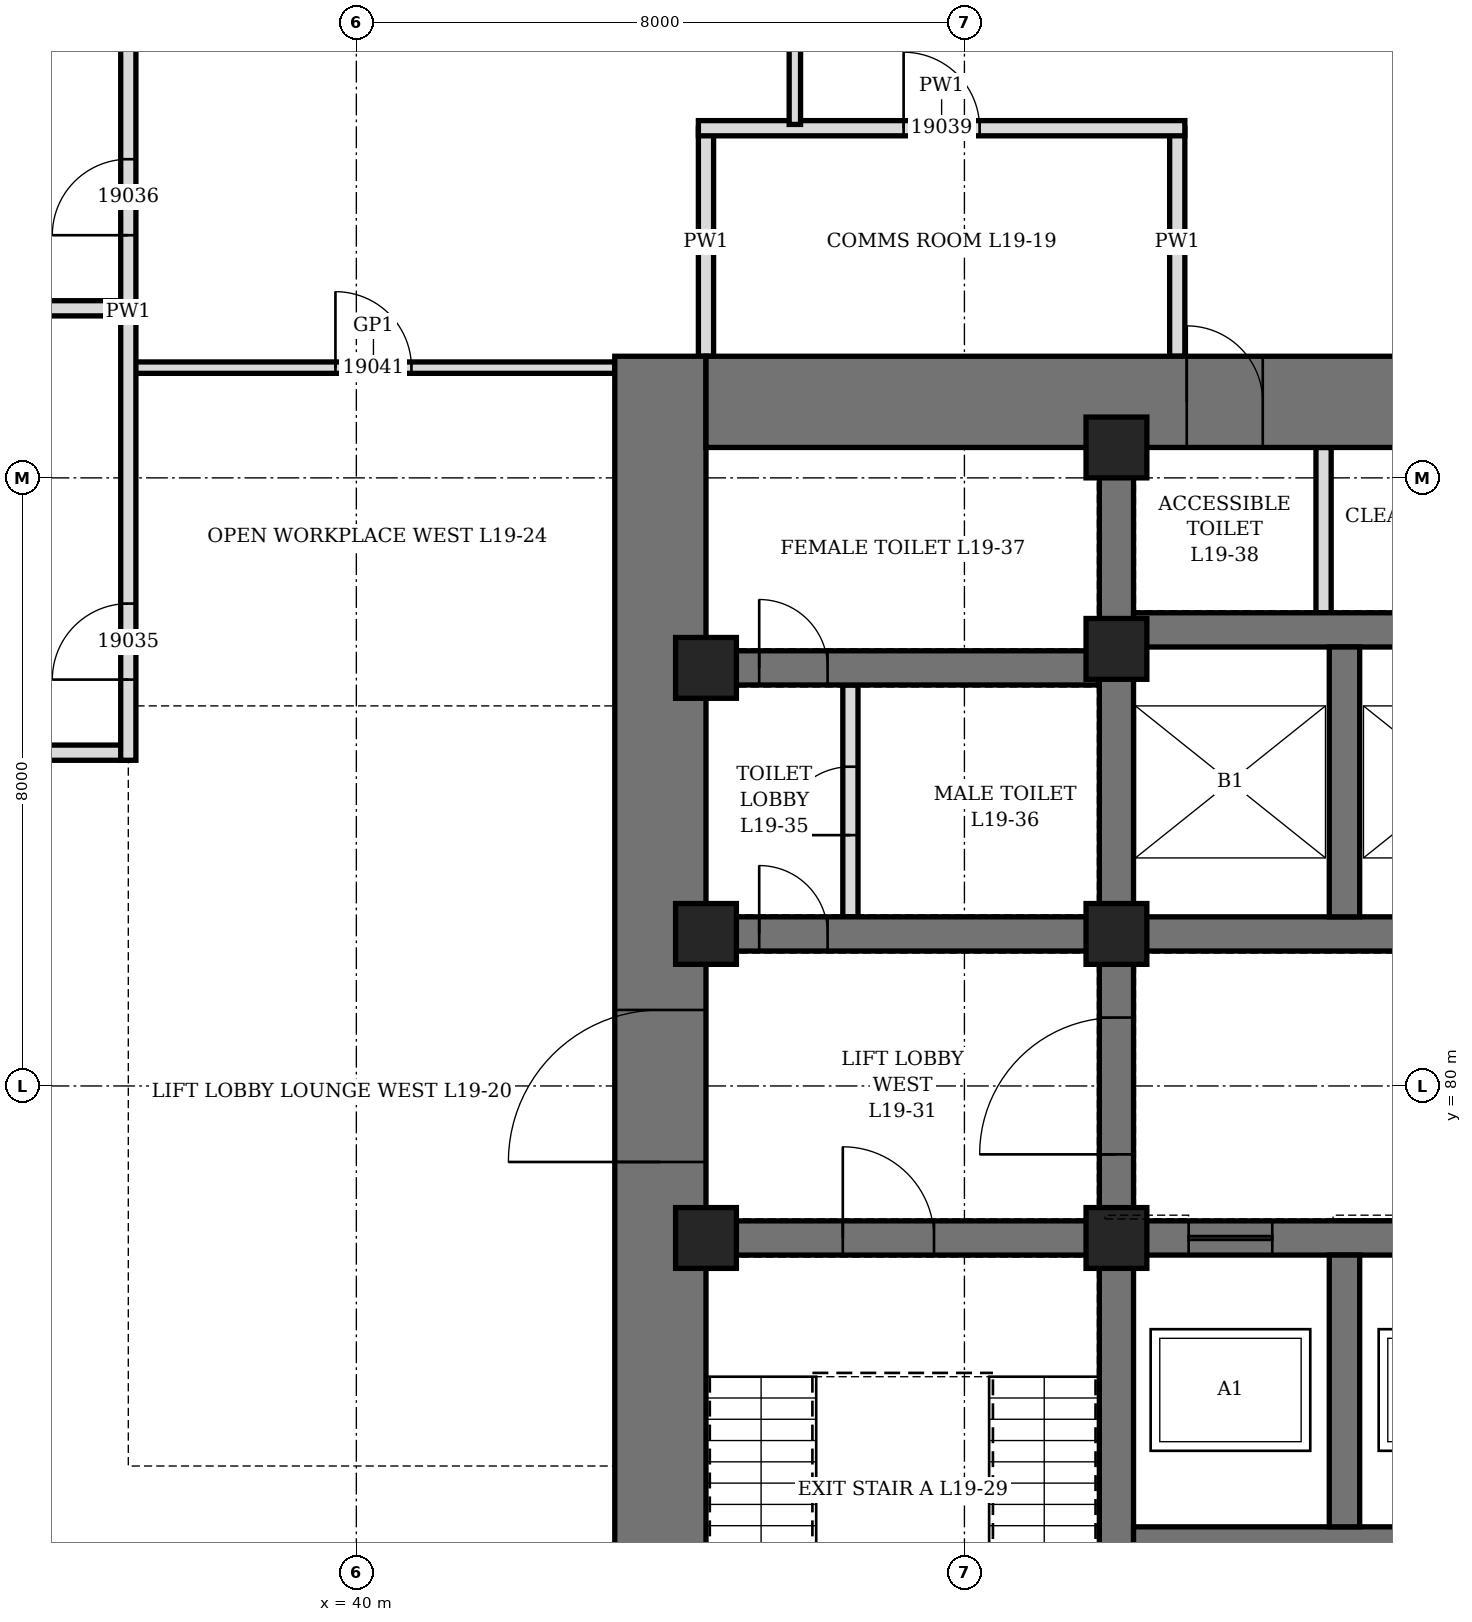
"""IFC4 building model, lengths in metres.
Left out: names, types, materials, properties, quantities, classifications, styles, units other than length and angle.
Written with IfcOpenShell. Run it as: python <this file> out.ifc"""

import sys

from ifc_helpers import new_model, si_unit, direction, frame, frame_2d, origin, origin_2d, place, context, subcontext, project, spatial, rectangle, hollow_rectangle, extrude, element, fill, save


model = new_model("IFC4")
c1 = context("Model", 3, precision=1e-05, world=origin(), true_north=direction((0.0, 1.0)))
c2 = subcontext(c1, "Body", "Model", "MODEL_VIEW")
j1 = project(units=[si_unit("LENGTHUNIT", "METRE"), si_unit("PLANEANGLEUNIT", "RADIAN")], contexts=[c1])
p1 = place(None, origin())
s1 = spatial("IfcSite", under=j1, at=p1, CompositionType="ELEMENT")
p2 = place(p1, origin())
s2 = spatial("IfcBuilding", under=s1, at=p2, CompositionType="ELEMENT")
p3 = place(p2, frame((0.0, 0.0, 89.5)))
s3 = spatial("IfcBuildingStorey", under=s2, at=p3, CompositionType="ELEMENT", Elevation=89.5)
p4 = place(p3, frame((44.0, 70.4, 0.0), z_axis=(0.0, 0.0, 1.0), x_axis=(0.0, 1.0, 0.0)))
e1 = element("IfcWall", 1, at=p4, inside=s3, PredefinedType="SHEAR", context=c2, shape_type="SweptSolid", body=[
    extrude(rectangle(XDim=19.2, YDim=1.2, at=frame_2d((9.6, 0.0))), origin(), (0.0, 0.0, 1.0), 4.2),
])
p5 = place(p4, frame((8.6, 0.0, 0.0)))
e2 = element("IfcOpeningElement", 2, at=p5, cuts=e1, PredefinedType="OPENING", context=c2, shape_type="SweptSolid", body=[
    extrude(rectangle(XDim=2.0, YDim=2.4, at=frame_2d((1.0, 1.2))), frame((0.0, 0.61, 0.0), z_axis=(0.0, -1.0, 0.0), x_axis=(1.0, 0.0, 0.0)), (0.0, 0.0, 1.0), 1.22),
])
p6 = place(p3, frame((44.6, 89.0, 0.0), z_axis=(0.0, 0.0, 1.0), x_axis=(1.0, 0.0, 0.0)))
e3 = element("IfcWall", 3, at=p6, inside=s3, PredefinedType="SHEAR", context=c2, shape_type="SweptSolid", body=[
    extrude(rectangle(XDim=22.8, YDim=1.2, at=frame_2d((11.4, 0.0))), origin(), (0.0, 0.0, 1.0), 4.2),
])
p7 = place(p6, frame((6.325, 0.0, 0.0)))
e4 = element("IfcOpeningElement", 4, at=p7, cuts=e3, PredefinedType="OPENING", context=c2, shape_type="SweptSolid", body=[
    extrude(rectangle(XDim=1.0, YDim=2.1, at=frame_2d((0.5, 1.05))), frame((0.0, 0.61, 0.0), z_axis=(0.0, -1.0, 0.0), x_axis=(1.0, 0.0, 0.0)), (0.0, 0.0, 1.0), 1.22),
])
p8 = place(p6, frame((9.25, 0.0, 0.0)))
e5 = element("IfcOpeningElement", 5, at=p8, cuts=e3, PredefinedType="OPENING", context=c2, shape_type="SweptSolid", body=[
    extrude(rectangle(XDim=0.9, YDim=2.1, at=frame_2d((0.45, 1.05))), frame((0.0, 0.61, 0.0), z_axis=(0.0, -1.0, 0.0), x_axis=(1.0, 0.0, 0.0)), (0.0, 0.0, 1.0), 1.22),
])
p9 = place(p6, frame((13.012, 0.0, 0.0)))
e6 = element("IfcOpeningElement", 6, at=p9, cuts=e3, PredefinedType="OPENING", context=c2, shape_type="SweptSolid", body=[
    extrude(rectangle(XDim=0.9, YDim=2.1, at=frame_2d((0.45, 1.05))), frame((0.0, 0.61, 0.0), z_axis=(0.0, -1.0, 0.0), x_axis=(1.0, 0.0, 0.0)), (0.0, 0.0, 1.0), 1.22),
])
p10 = place(p3, frame((50.0, 71.6, 0.0), z_axis=(0.0, 0.0, 1.0), x_axis=(0.0, 1.0, 0.0)))
e7 = element("IfcWall", 7, at=p10, inside=s3, PredefinedType="SHEAR", context=c2, shape_type="SweptSolid", body=[
    extrude(rectangle(XDim=16.8, YDim=0.45, at=frame_2d((8.4, 0.0))), origin(), (0.0, 0.0, 1.0), 4.2),
])
p11 = place(p10, frame((7.5, 0.0, 0.0)))
e8 = element("IfcOpeningElement", 8, at=p11, cuts=e7, PredefinedType="OPENING", context=c2, shape_type="SweptSolid", body=[
    extrude(rectangle(XDim=1.8, YDim=2.4, at=frame_2d((0.9, 1.2))), frame((0.0, 0.235, 0.0), z_axis=(0.0, -1.0, 0.0), x_axis=(1.0, 0.0, 0.0)), (0.0, 0.0, 1.0), 0.47),
])
p12 = place(p3, frame((44.6, 78.0, 0.0), z_axis=(0.0, 0.0, 1.0), x_axis=(1.0, 0.0, 0.0)))
e9 = element("IfcWall", 9, at=p12, inside=s3, PredefinedType="SHEAR", context=c2, shape_type="SweptSolid", body=[
    extrude(rectangle(XDim=5.175, YDim=0.45, at=frame_2d((2.587, 0.0))), origin(), (0.0, 0.0, 1.0), 4.2),
])
p13 = place(p12, frame((1.8, 0.0, 0.0)))
e10 = element("IfcOpeningElement", 10, at=p13, cuts=e9, PredefinedType="OPENING", context=c2, shape_type="SweptSolid", body=[
    extrude(rectangle(XDim=1.2, YDim=2.1, at=frame_2d((0.6, 1.05))), frame((0.0, 0.235, 0.0), z_axis=(0.0, -1.0, 0.0), x_axis=(1.0, 0.0, 0.0)), (0.0, 0.0, 1.0), 0.47),
])
p14 = place(p3, frame((44.6, 82.0, 0.0), z_axis=(0.0, 0.0, 1.0), x_axis=(1.0, 0.0, 0.0)))
e11 = element("IfcWall", 11, at=p14, inside=s3, PredefinedType="SHEAR", context=c2, shape_type="SweptSolid", body=[
    extrude(rectangle(XDim=5.175, YDim=0.45, at=frame_2d((2.587, 0.0))), origin(), (0.0, 0.0, 1.0), 4.2),
])
p15 = place(p14, frame((0.7, 0.0, 0.0)))
e12 = element("IfcOpeningElement", 12, at=p15, cuts=e11, PredefinedType="OPENING", context=c2, shape_type="SweptSolid", body=[
    extrude(rectangle(XDim=0.9, YDim=2.1, at=frame_2d((0.45, 1.05))), frame((0.0, 0.235, 0.0), z_axis=(0.0, -1.0, 0.0), x_axis=(1.0, 0.0, 0.0)), (0.0, 0.0, 1.0), 0.47),
])
p16 = place(p3, frame((44.6, 85.5, 0.0), z_axis=(0.0, 0.0, 1.0), x_axis=(1.0, 0.0, 0.0)))
e13 = element("IfcWall", 13, at=p16, inside=s3, PredefinedType="SHEAR", context=c2, shape_type="SweptSolid", body=[
    extrude(rectangle(XDim=5.175, YDim=0.45, at=frame_2d((2.587, 0.0))), origin(), (0.0, 0.0, 1.0), 4.2),
])
p17 = place(p16, frame((0.7, 0.0, 0.0)))
e14 = element("IfcOpeningElement", 14, at=p17, cuts=e13, PredefinedType="OPENING", context=c2, shape_type="SweptSolid", body=[
    extrude(rectangle(XDim=0.9, YDim=2.1, at=frame_2d((0.45, 1.05))), frame((0.0, 0.235, 0.0), z_axis=(0.0, -1.0, 0.0), x_axis=(1.0, 0.0, 0.0)), (0.0, 0.0, 1.0), 0.47),
])
p18 = place(p3, frame((50.225, 78.0, 0.0), z_axis=(0.0, 0.0, 1.0), x_axis=(1.0, 0.0, 0.0)))
e15 = element("IfcWall", 15, at=p18, inside=s3, PredefinedType="SHEAR", context=c2, shape_type="SweptSolid", body=[
    extrude(rectangle(XDim=11.55, YDim=0.45, at=frame_2d((5.775, 0.0))), origin(), (0.0, 0.0, 1.0), 4.2),
])
p19 = place(p18, frame((0.725, 0.0, 0.0)))
e16 = element("IfcOpeningElement", 16, at=p19, cuts=e15, PredefinedType="OPENING", context=c2, shape_type="SweptSolid", body=[
    extrude(rectangle(XDim=1.1, YDim=2.2, at=frame_2d((0.55, 1.1))), frame((0.0, 0.235, 0.0), z_axis=(0.0, -1.0, 0.0), x_axis=(1.0, 0.0, 0.0)), (0.0, 0.0, 1.0), 0.47),
])
p20 = place(p18, frame((3.725, 0.0, 0.0)))
e17 = element("IfcOpeningElement", 17, at=p20, cuts=e15, PredefinedType="OPENING", context=c2, shape_type="SweptSolid", body=[
    extrude(rectangle(XDim=1.1, YDim=2.2, at=frame_2d((0.55, 1.1))), frame((0.0, 0.235, 0.0), z_axis=(0.0, -1.0, 0.0), x_axis=(1.0, 0.0, 0.0)), (0.0, 0.0, 1.0), 0.47),
])
p21 = place(p18, frame((6.725, 0.0, 0.0)))
e18 = element("IfcOpeningElement", 18, at=p21, cuts=e15, PredefinedType="OPENING", context=c2, shape_type="SweptSolid", body=[
    extrude(rectangle(XDim=1.1, YDim=2.2, at=frame_2d((0.55, 1.1))), frame((0.0, 0.235, 0.0), z_axis=(0.0, -1.0, 0.0), x_axis=(1.0, 0.0, 0.0)), (0.0, 0.0, 1.0), 0.47),
])
p22 = place(p18, frame((9.725, 0.0, 0.0)))
e19 = element("IfcOpeningElement", 19, at=p22, cuts=e15, PredefinedType="OPENING", context=c2, shape_type="SweptSolid", body=[
    extrude(rectangle(XDim=1.1, YDim=2.2, at=frame_2d((0.55, 1.1))), frame((0.0, 0.235, 0.0), z_axis=(0.0, -1.0, 0.0), x_axis=(1.0, 0.0, 0.0)), (0.0, 0.0, 1.0), 0.47),
])
for number, where, z_axis, x_axis in (
    (20, (50.225, 82.0, 0.0), (0.0, 0.0, 1.0), (1.0, 0.0, 0.0)),
    (21, (50.225, 86.0, 0.0), (0.0, 0.0, 1.0), (1.0, 0.0, 0.0)),
):
    element("IfcWall", number, at=place(p3, frame(where, z_axis=z_axis, x_axis=x_axis)), inside=s3, PredefinedType="SHEAR", context=c2, shape_type="SweptSolid", body=[
        extrude(rectangle(XDim=11.55, YDim=0.45, at=frame_2d((5.775, 0.0))), origin(), (0.0, 0.0, 1.0), 4.2),
    ])
p23 = place(p3, frame((50.225, 74.0, 0.0), z_axis=(0.0, 0.0, 1.0), x_axis=(1.0, 0.0, 0.0)))
e22 = element("IfcWall", 22, at=p23, inside=s3, PredefinedType="SHEAR", context=c2, shape_type="SweptSolid", body=[
    extrude(rectangle(XDim=11.55, YDim=0.4, at=frame_2d((5.775, 0.0))), origin(), (0.0, 0.0, 1.0), 4.2),
])
p24 = place(p3, frame((53.0, 74.2, 0.0), z_axis=(0.0, 0.0, 1.0), x_axis=(0.0, 1.0, 0.0)))
e23 = element("IfcWall", 23, at=p24, inside=s3, PredefinedType="SHEAR", context=c2, shape_type="SweptSolid", body=[
    extrude(rectangle(XDim=3.575, YDim=0.4, at=frame_2d((1.788, 0.0))), origin(), (0.0, 0.0, 1.0), 4.2),
])
p25 = place(p3, frame((53.0, 82.225, 0.0), z_axis=(0.0, 0.0, 1.0), x_axis=(0.0, 1.0, 0.0)))
e24 = element("IfcWall", 24, at=p25, inside=s3, PredefinedType="SHEAR", context=c2, shape_type="SweptSolid", body=[
    extrude(rectangle(XDim=3.55, YDim=0.4, at=frame_2d((1.775, 0.0))), origin(), (0.0, 0.0, 1.0), 4.2),
])
for number, where, z_axis, x_axis in (
    (25, (44.6, 78.0, 0.0), (0.0, 0.0, 1.0), (1.0, 0.0, 0.0)),
    (26, (44.6, 82.0, 0.0), (0.0, 0.0, 1.0), (1.0, 0.0, 0.0)),
    (27, (44.6, 85.5, 0.0), (0.0, 0.0, 1.0), (1.0, 0.0, 0.0)),
    (28, (50.0, 78.0, 0.0), (0.0, 0.0, 1.0), (1.0, 0.0, 0.0)),
    (29, (50.0, 82.0, 0.0), (0.0, 0.0, 1.0), (1.0, 0.0, 0.0)),
    (30, (50.0, 85.75, 0.0), (0.0, 0.0, 1.0), (1.0, 0.0, 0.0)),
    (31, (50.0, 88.4, 0.0), (0.0, 0.0, 1.0), (1.0, 0.0, 0.0)),
):
    element("IfcColumn", number, at=place(p3, frame(where, z_axis=z_axis, x_axis=x_axis)), inside=s3, PredefinedType="COLUMN", context=c2, shape_type="SweptSolid", body=[
        extrude(hollow_rectangle(XDim=0.8, YDim=0.8, WallThickness=0.1, at=origin_2d()), origin(), (0.0, 0.0, 1.0), 4.2),
    ])
p26 = place(p3, frame((46.5, 82.225, 0.0), z_axis=(0.0, 0.0, 1.0), x_axis=(0.0, 1.0, 0.0)))
e32 = element("IfcWall", 32, at=p26, inside=s3, PredefinedType="PARTITIONING", context=c2, shape_type="SweptSolid", body=[
    extrude(rectangle(XDim=3.05, YDim=0.2, at=frame_2d((1.525, 0.0))), origin(), (0.0, 0.0, 1.0), 4.04),
])
p27 = place(p26, frame((1.075, 0.0, 0.0)))
e33 = element("IfcOpeningElement", 33, at=p27, cuts=e32, PredefinedType="OPENING", context=c2, shape_type="SweptSolid", body=[
    extrude(rectangle(XDim=0.9, YDim=2.1, at=frame_2d((0.45, 1.05))), frame((0.0, 0.11, 0.0), z_axis=(0.0, -1.0, 0.0), x_axis=(1.0, 0.0, 0.0)), (0.0, 0.0, 1.0), 0.22),
])
p28 = place(p3, frame((52.725, 86.225, 0.0), z_axis=(0.0, 0.0, 1.0), x_axis=(0.0, 1.0, 0.0)))
e34 = element("IfcWall", 34, at=p28, inside=s3, PredefinedType="PARTITIONING", context=c2, shape_type="SweptSolid", body=[
    extrude(rectangle(XDim=2.175, YDim=0.2, at=frame_2d((1.087, 0.0))), origin(), (0.0, 0.0, 1.0), 4.04),
])
for number, where, z_axis, x_axis in (
    (35, (32.45, 84.385, 0.0), (0.0, 0.0, 1.0), (1.0, 0.0, 0.0)),
    (36, (32.45, 90.231, 0.0), (0.0, 0.0, 1.0), (1.0, 0.0, 0.0)),
):
    element("IfcWall", number, at=place(p3, frame(where, z_axis=z_axis, x_axis=x_axis)), inside=s3, PredefinedType="PARTITIONING", context=c2, shape_type="SweptSolid", body=[
        extrude(rectangle(XDim=4.55, YDim=0.2, at=frame_2d((2.275, 0.0))), origin(), (0.0, 0.0, 1.0), 3.428),
    ])
for number, where, z_axis, x_axis in (
    (37, (44.6, 89.6, 0.0), (0.0, 0.0, 1.0), (0.0, 1.0, 0.0)),
    (38, (50.8, 89.6, 0.0), (0.0, 0.0, 1.0), (0.0, 1.0, 0.0)),
):
    element("IfcWall", number, at=place(p3, frame(where, z_axis=z_axis, x_axis=x_axis)), inside=s3, PredefinedType="PARTITIONING", context=c2, shape_type="SweptSolid", body=[
        extrude(rectangle(XDim=3.0, YDim=0.2, at=frame_2d((1.5, 0.0))), origin(), (0.0, 0.0, 1.0), 4.04),
    ])
p29 = place(p3, frame((37.05, 89.45, 0.0), z_axis=(0.0, 0.0, 1.0), x_axis=(1.0, 0.0, 0.0)))
e39 = element("IfcWall", 39, at=p29, inside=s3, PredefinedType="PARTITIONING", context=c2, shape_type="SweptSolid", body=[
    extrude(rectangle(XDim=6.35, YDim=0.15, at=frame_2d((3.175, 0.0))), origin(), (0.0, 0.0, 1.0), 4.04),
])
p30 = place(p29, frame((2.675, 0.0, 0.0)))
e40 = element("IfcOpeningElement", 40, at=p30, cuts=e39, PredefinedType="OPENING", context=c2, shape_type="SweptSolid", body=[
    extrude(rectangle(XDim=1.0, YDim=2.4, at=frame_2d((0.5, 1.2))), frame((0.0, 0.085, 0.0), z_axis=(0.0, -1.0, 0.0), x_axis=(1.0, 0.0, 0.0)), (0.0, 0.0, 1.0), 0.17),
])
p31 = place(p3, frame((44.5, 92.6, 0.0), z_axis=(0.0, 0.0, 1.0), x_axis=(1.0, 0.0, 0.0)))
e41 = element("IfcWall", 41, at=p31, inside=s3, PredefinedType="PARTITIONING", context=c2, shape_type="SweptSolid", body=[
    extrude(rectangle(XDim=6.4, YDim=0.2, at=frame_2d((3.2, 0.0))), origin(), (0.0, 0.0, 1.0), 4.04),
])
p32 = place(p31, frame((2.7, 0.0, 0.0)))
e42 = element("IfcOpeningElement", 42, at=p32, cuts=e41, PredefinedType="OPENING", context=c2, shape_type="SweptSolid", body=[
    extrude(rectangle(XDim=1.0, YDim=2.1, at=frame_2d((0.5, 1.05))), frame((0.0, 0.11, 0.0), z_axis=(0.0, -1.0, 0.0), x_axis=(1.0, 0.0, 0.0)), (0.0, 0.0, 1.0), 0.22),
])
p33 = place(p3, frame((37.0, 84.285, 0.0), z_axis=(0.0, 0.0, 1.0), x_axis=(0.0, 1.0, 0.0)))
e43 = element("IfcWall", 43, at=p33, inside=s3, PredefinedType="PARTITIONING", context=c2, shape_type="SweptSolid", body=[
    extrude(rectangle(XDim=11.792, YDim=0.2, at=frame_2d((5.896, 0.0))), origin(), (0.0, 0.0, 1.0), 4.04),
])
p34 = place(p33, frame((1.062, 0.0, 0.0)))
e44 = element("IfcOpeningElement", 44, at=p34, cuts=e43, PredefinedType="OPENING", context=c2, shape_type="SweptSolid", body=[
    extrude(rectangle(XDim=1.0, YDim=2.1, at=frame_2d((0.5, 1.05))), frame((0.0, 0.11, 0.0), z_axis=(0.0, -1.0, 0.0), x_axis=(1.0, 0.0, 0.0)), (0.0, 0.0, 1.0), 0.22),
])
p35 = place(p33, frame((6.908, 0.0, 0.0)))
e45 = element("IfcOpeningElement", 45, at=p35, cuts=e43, PredefinedType="OPENING", context=c2, shape_type="SweptSolid", body=[
    extrude(rectangle(XDim=1.0, YDim=2.1, at=frame_2d((0.5, 1.05))), frame((0.0, 0.11, 0.0), z_axis=(0.0, -1.0, 0.0), x_axis=(1.0, 0.0, 0.0)), (0.0, 0.0, 1.0), 0.22),
])
p36 = place(p3, frame((45.769, 92.65, 0.0), z_axis=(0.0, 0.0, 1.0), x_axis=(0.0, 1.0, 0.0)))
e46 = element("IfcWall", 46, at=p36, inside=s3, PredefinedType="PARTITIONING", context=c2, shape_type="SweptSolid", body=[
    extrude(rectangle(XDim=12.04, YDim=0.15, at=frame_2d((6.02, 0.0))), origin(), (0.0, 0.0, 1.0), 3.278),
])
p37 = place(p36, frame((5.52, 0.0, 0.0)))
e47 = element("IfcOpeningElement", 47, at=p37, cuts=e46, PredefinedType="OPENING", context=c2, shape_type="SweptSolid", body=[
    extrude(rectangle(XDim=1.0, YDim=2.4, at=frame_2d((0.5, 1.2))), frame((0.0, 0.085, 0.0), z_axis=(0.0, -1.0, 0.0), x_axis=(1.0, 0.0, 0.0)), (0.0, 0.0, 1.0), 0.17),
])
p38 = place(p15, origin())
e48 = element("IfcDoor", 48, at=p38, inside=s3, OperationType="SINGLE_SWING_LEFT", PredefinedType="DOOR", context=c2, shape_type="SweptSolid", body=[
    extrude(rectangle(XDim=0.9, YDim=2.1, at=frame_2d((0.45, 1.05))), frame((0.0, 0.225, 0.0), z_axis=(0.0, -1.0, 0.0), x_axis=(1.0, 0.0, 0.0)), (0.0, 0.0, 1.0), 0.449),
])
fill(e12, e48)
p39 = place(p27, origin())
e49 = element("IfcDoor", 49, at=p39, inside=s3, OperationType="SINGLE_SWING_RIGHT", PredefinedType="DOOR", context=c2, shape_type="SweptSolid", body=[
    extrude(rectangle(XDim=0.9, YDim=2.1, at=frame_2d((0.45, 1.05))), frame((0.0, 0.1, 0.0), z_axis=(0.0, -1.0, 0.0), x_axis=(1.0, 0.0, 0.0)), (0.0, 0.0, 1.0), 0.199),
])
fill(e33, e49)
p40 = place(p17, origin())
e50 = element("IfcDoor", 50, at=p40, inside=s3, OperationType="SINGLE_SWING_RIGHT", PredefinedType="DOOR", context=c2, shape_type="SweptSolid", body=[
    extrude(rectangle(XDim=0.9, YDim=2.1, at=frame_2d((0.45, 1.05))), frame((0.0, 0.225, 0.0), z_axis=(0.0, -1.0, 0.0), x_axis=(1.0, 0.0, 0.0)), (0.0, 0.0, 1.0), 0.449),
])
fill(e14, e50)
p41 = place(p7, origin())
e51 = element("IfcDoor", 51, at=p41, inside=s3, OperationType="SINGLE_SWING_LEFT", PredefinedType="DOOR", context=c2, shape_type="SweptSolid", body=[
    extrude(rectangle(XDim=1.0, YDim=2.1, at=frame_2d((0.5, 1.05))), frame((0.0, 0.35, 0.0), z_axis=(0.0, -1.0, 0.0), x_axis=(1.0, 0.0, 0.0)), (0.0, 0.0, 1.0), 0.7),
])
fill(e4, e51)
p42 = place(p13, origin())
e52 = element("IfcDoor", 52, at=p42, inside=s3, OperationType="SINGLE_SWING_LEFT", PredefinedType="DOOR", context=c2, shape_type="SweptSolid", body=[
    extrude(rectangle(XDim=1.2, YDim=2.1, at=frame_2d((0.6, 1.05))), frame((0.0, 0.225, 0.0), z_axis=(0.0, -1.0, 0.0), x_axis=(1.0, 0.0, 0.0)), (0.0, 0.0, 1.0), 0.449),
])
fill(e10, e52)
p43 = place(p5, origin())
e53 = element("IfcDoor", 53, at=p43, inside=s3, OperationType="DOUBLE_DOOR_SINGLE_SWING", PredefinedType="DOOR", context=c2, shape_type="SweptSolid", body=[
    extrude(rectangle(XDim=2.0, YDim=2.4, at=frame_2d((1.0, 1.2))), frame((0.0, 0.35, 0.0), z_axis=(0.0, -1.0, 0.0), x_axis=(1.0, 0.0, 0.0)), (0.0, 0.0, 1.0), 0.7),
])
fill(e2, e53)
p44 = place(p11, origin())
e54 = element("IfcDoor", 54, at=p44, inside=s3, OperationType="DOUBLE_DOOR_SINGLE_SWING", PredefinedType="DOOR", context=c2, shape_type="SweptSolid", body=[
    extrude(rectangle(XDim=1.8, YDim=2.4, at=frame_2d((0.9, 1.2))), frame((0.0, 0.225, 0.0), z_axis=(0.0, -1.0, 0.0), x_axis=(1.0, 0.0, 0.0)), (0.0, 0.0, 1.0), 0.449),
])
fill(e8, e54)
p45 = place(p19, origin())
e55 = element("IfcDoor", 55, at=p45, inside=s3, OperationType="SLIDING_TO_LEFT", PredefinedType="DOOR", context=c2, shape_type="SweptSolid", body=[
    extrude(rectangle(XDim=1.1, YDim=2.2, at=frame_2d((0.55, 1.1))), frame((0.0, 0.225, 0.0), z_axis=(0.0, -1.0, 0.0), x_axis=(1.0, 0.0, 0.0)), (0.0, 0.0, 1.0), 0.449),
])
fill(e16, e55)
p46 = place(p34, origin())
e56 = element("IfcDoor", 56, at=p46, inside=s3, OperationType="SINGLE_SWING_LEFT", PredefinedType="DOOR", context=c2, shape_type="SweptSolid", body=[
    extrude(rectangle(XDim=1.0, YDim=2.1, at=frame_2d((0.5, 1.05))), frame((0.0, 0.1, 0.0), z_axis=(0.0, -1.0, 0.0), x_axis=(1.0, 0.0, 0.0)), (0.0, 0.0, 1.0), 0.199),
])
fill(e44, e56)
p47 = place(p35, origin())
e57 = element("IfcDoor", 57, at=p47, inside=s3, OperationType="SINGLE_SWING_LEFT", PredefinedType="DOOR", context=c2, shape_type="SweptSolid", body=[
    extrude(rectangle(XDim=1.0, YDim=2.1, at=frame_2d((0.5, 1.05))), frame((0.0, 0.1, 0.0), z_axis=(0.0, -1.0, 0.0), x_axis=(1.0, 0.0, 0.0)), (0.0, 0.0, 1.0), 0.199),
])
fill(e45, e57)
p48 = place(p32, origin())
e58 = element("IfcDoor", 58, at=p48, inside=s3, OperationType="SINGLE_SWING_LEFT", PredefinedType="DOOR", context=c2, shape_type="SweptSolid", body=[
    extrude(rectangle(XDim=1.0, YDim=2.1, at=frame_2d((0.5, 1.05))), frame((0.0, 0.1, 0.0), z_axis=(0.0, -1.0, 0.0), x_axis=(1.0, 0.0, 0.0)), (0.0, 0.0, 1.0), 0.199),
])
fill(e42, e58)
p49 = place(p30, origin())
e59 = element("IfcDoor", 59, at=p49, inside=s3, OperationType="SINGLE_SWING_RIGHT", PredefinedType="DOOR", context=c2, shape_type="SweptSolid", body=[
    extrude(rectangle(XDim=1.0, YDim=2.4, at=frame_2d((0.5, 1.2))), frame((0.0, 0.075, 0.0), z_axis=(0.0, -1.0, 0.0), x_axis=(1.0, 0.0, 0.0)), (0.0, 0.0, 1.0), 0.149),
])
fill(e40, e59)
save(model, sys.argv[1])
